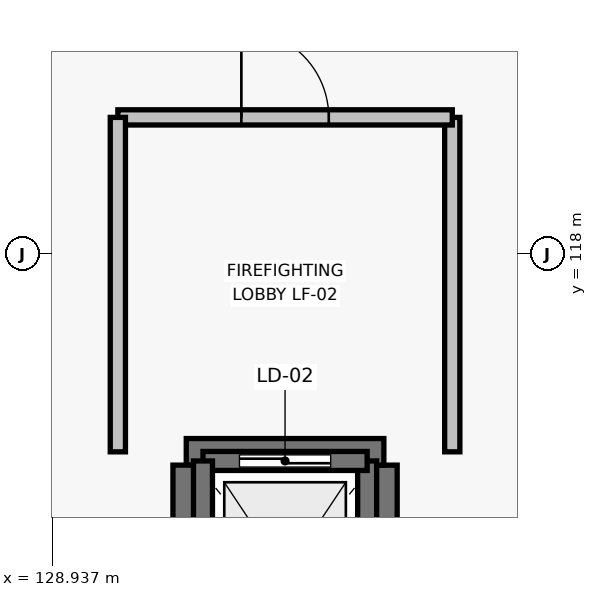
"""IFC4 building model, lengths in metres.
Left out: names, types, materials, properties, quantities, classifications, styles, units other than length and angle.
Written with IfcOpenShell. Run it as: python <this file> out.ifc"""

import sys

from ifc_helpers import new_model, si_unit, direction, frame, frame_2d, origin, place, context, subcontext, project, spatial, rectangle, extrude, element, fill, save


model = new_model("IFC4")
c1 = context("Model", 3, precision=1e-05, world=origin(), true_north=direction((0.0, 1.0)))
c2 = subcontext(c1, "Body", "Model", "MODEL_VIEW")
j1 = project(units=[si_unit("LENGTHUNIT", "METRE"), si_unit("PLANEANGLEUNIT", "RADIAN")], contexts=[c1])
p1 = place(None, origin())
s1 = spatial("IfcSite", under=j1, at=p1, CompositionType="ELEMENT")
p2 = place(p1, origin())
s2 = spatial("IfcBuilding", under=s1, at=p2, CompositionType="ELEMENT")
p3 = place(p2, frame((0.0, 0.0, -6.0)))
s3 = spatial("IfcBuildingStorey", under=s2, at=p3, CompositionType="ELEMENT", Elevation=-6.0)
p4 = place(p3, frame((133.3, 112.375, -1.2), z_axis=(0.0, 0.0, 1.0), x_axis=(0.0, 1.0, 0.0)))
e1 = element("IfcWall", 1, at=p4, inside=s3, PredefinedType="SOLIDWALL", context=c2, shape_type="SweptSolid", body=[
    extrude(rectangle(XDim=2.85, YDim=0.35, at=frame_2d((1.425, 0.0))), origin(), (0.0, 0.0, 1.0), 1.2),
])
p5 = place(p3, frame((133.3, 115.4, -1.2), z_axis=(0.0, 0.0, 1.0), x_axis=(-1.0, 0.0, 0.0)))
e2 = element("IfcWall", 2, at=p5, inside=s3, PredefinedType="SOLIDWALL", context=c2, shape_type="SweptSolid", body=[
    extrude(rectangle(XDim=2.6, YDim=0.35, at=frame_2d((1.3, 0.0))), origin(), (0.0, 0.0, 1.0), 1.2),
])
p6 = place(p3, frame((130.7, 115.225, -1.2), z_axis=(0.0, 0.0, 1.0), x_axis=(0.0, -1.0, 0.0)))
e3 = element("IfcWall", 3, at=p6, inside=s3, PredefinedType="SOLIDWALL", context=c2, shape_type="SweptSolid", body=[
    extrude(rectangle(XDim=2.85, YDim=0.35, at=frame_2d((1.425, 0.0))), origin(), (0.0, 0.0, 1.0), 1.2),
])
p7 = place(p3, frame((133.08, 112.32, 0.0), z_axis=(0.0, 0.0, 1.0), x_axis=(0.0, 1.0, 0.0)))
e4 = element("IfcWall", 4, at=p7, inside=s3, PredefinedType="SHEAR", context=c2, shape_type="SweptSolid", body=[
    extrude(rectangle(XDim=2.96, YDim=0.25, at=frame_2d((1.48, 0.0))), origin(), (0.0, 0.0, 1.0), 5.76),
])
p8 = place(p3, frame((133.08, 115.28, 0.0), z_axis=(0.0, 0.0, 1.0), x_axis=(-1.0, 0.0, 0.0)))
e5 = element("IfcWall", 5, at=p8, inside=s3, PredefinedType="SHEAR", context=c2, shape_type="SweptSolid", body=[
    extrude(rectangle(XDim=2.16, YDim=0.25, at=frame_2d((1.08, 0.0))), origin(), (0.0, 0.0, 1.0), 5.76),
])
p9 = place(p8, frame((0.48, 0.0, 0.0)))
e6 = element("IfcOpeningElement", 6, at=p9, cuts=e5, PredefinedType="OPENING", context=c2, shape_type="SweptSolid", body=[
    extrude(rectangle(XDim=1.2, YDim=2.2, at=frame_2d((0.6, 1.1))), frame((0.0, 0.135, 0.0), z_axis=(0.0, -1.0, 0.0), x_axis=(1.0, 0.0, 0.0)), (0.0, 0.0, 1.0), 0.27),
])
p10 = place(p3, frame((130.92, 115.28, 0.0), z_axis=(0.0, 0.0, 1.0), x_axis=(0.0, -1.0, 0.0)))
e7 = element("IfcWall", 7, at=p10, inside=s3, PredefinedType="SHEAR", context=c2, shape_type="SweptSolid", body=[
    extrude(rectangle(XDim=2.96, YDim=0.25, at=frame_2d((1.48, 0.0))), origin(), (0.0, 0.0, 1.0), 5.76),
])
p11 = place(p3, frame((134.2, 115.4, 0.0), z_axis=(0.0, 0.0, 1.0), x_axis=(0.0, 1.0, 0.0)))
e8 = element("IfcWall", 8, at=p11, inside=s3, PredefinedType="PARTITIONING", context=c2, shape_type="SweptSolid", body=[
    extrude(rectangle(XDim=4.4, YDim=0.2, at=frame_2d((2.2, 0.0))), origin(), (0.0, 0.0, 1.0), 5.395),
])
p12 = place(p3, frame((134.2, 119.8, 0.0), z_axis=(0.0, 0.0, 1.0), x_axis=(-1.0, 0.0, 0.0)))
e9 = element("IfcWall", 9, at=p12, inside=s3, PredefinedType="PARTITIONING", context=c2, shape_type="SweptSolid", body=[
    extrude(rectangle(XDim=4.4, YDim=0.2, at=frame_2d((2.2, 0.0))), origin(), (0.0, 0.0, 1.0), 5.75),
])
p13 = place(p12, frame((1.625, 0.0, 0.0)))
e10 = element("IfcOpeningElement", 10, at=p13, cuts=e9, PredefinedType="OPENING", context=c2, shape_type="SweptSolid", body=[
    extrude(rectangle(XDim=1.15, YDim=2.2, at=frame_2d((0.575, 1.1))), frame((0.0, 0.11, 0.0), z_axis=(0.0, -1.0, 0.0), x_axis=(1.0, 0.0, 0.0)), (0.0, 0.0, 1.0), 0.22),
])
p14 = place(p3, frame((129.8, 119.8, 0.0), z_axis=(0.0, 0.0, 1.0), x_axis=(0.0, -1.0, 0.0)))
e11 = element("IfcWall", 11, at=p14, inside=s3, PredefinedType="PARTITIONING", context=c2, shape_type="SweptSolid", body=[
    extrude(rectangle(XDim=4.4, YDim=0.2, at=frame_2d((2.2, 0.0))), origin(), (0.0, 0.0, 1.0), 5.75),
])
p15 = place(p9, origin())
e12 = element("IfcDoor", 12, at=p15, inside=s3, OperationType="SLIDING_TO_LEFT", PredefinedType="DOOR", context=c2, shape_type="SweptSolid", body=[
    extrude(rectangle(XDim=1.2, YDim=2.2, at=frame_2d((0.6, 1.1))), frame((0.0, 0.025, 0.0), z_axis=(0.0, -1.0, 0.0), x_axis=(1.0, 0.0, 0.0)), (0.0, 0.0, 1.0), 0.05),
])
fill(e6, e12)
p16 = place(p13, origin())
e13 = element("IfcDoor", 13, at=p16, inside=s3, OperationType="SINGLE_SWING_RIGHT", PredefinedType="DOOR", context=c2, shape_type="SweptSolid", body=[
    extrude(rectangle(XDim=1.15, YDim=2.2, at=frame_2d((0.575, 1.1))), frame((0.0, 0.025, 0.0), z_axis=(0.0, -1.0, 0.0), x_axis=(1.0, 0.0, 0.0)), (0.0, 0.0, 1.0), 0.05),
])
fill(e10, e13)
save(model, sys.argv[1])
